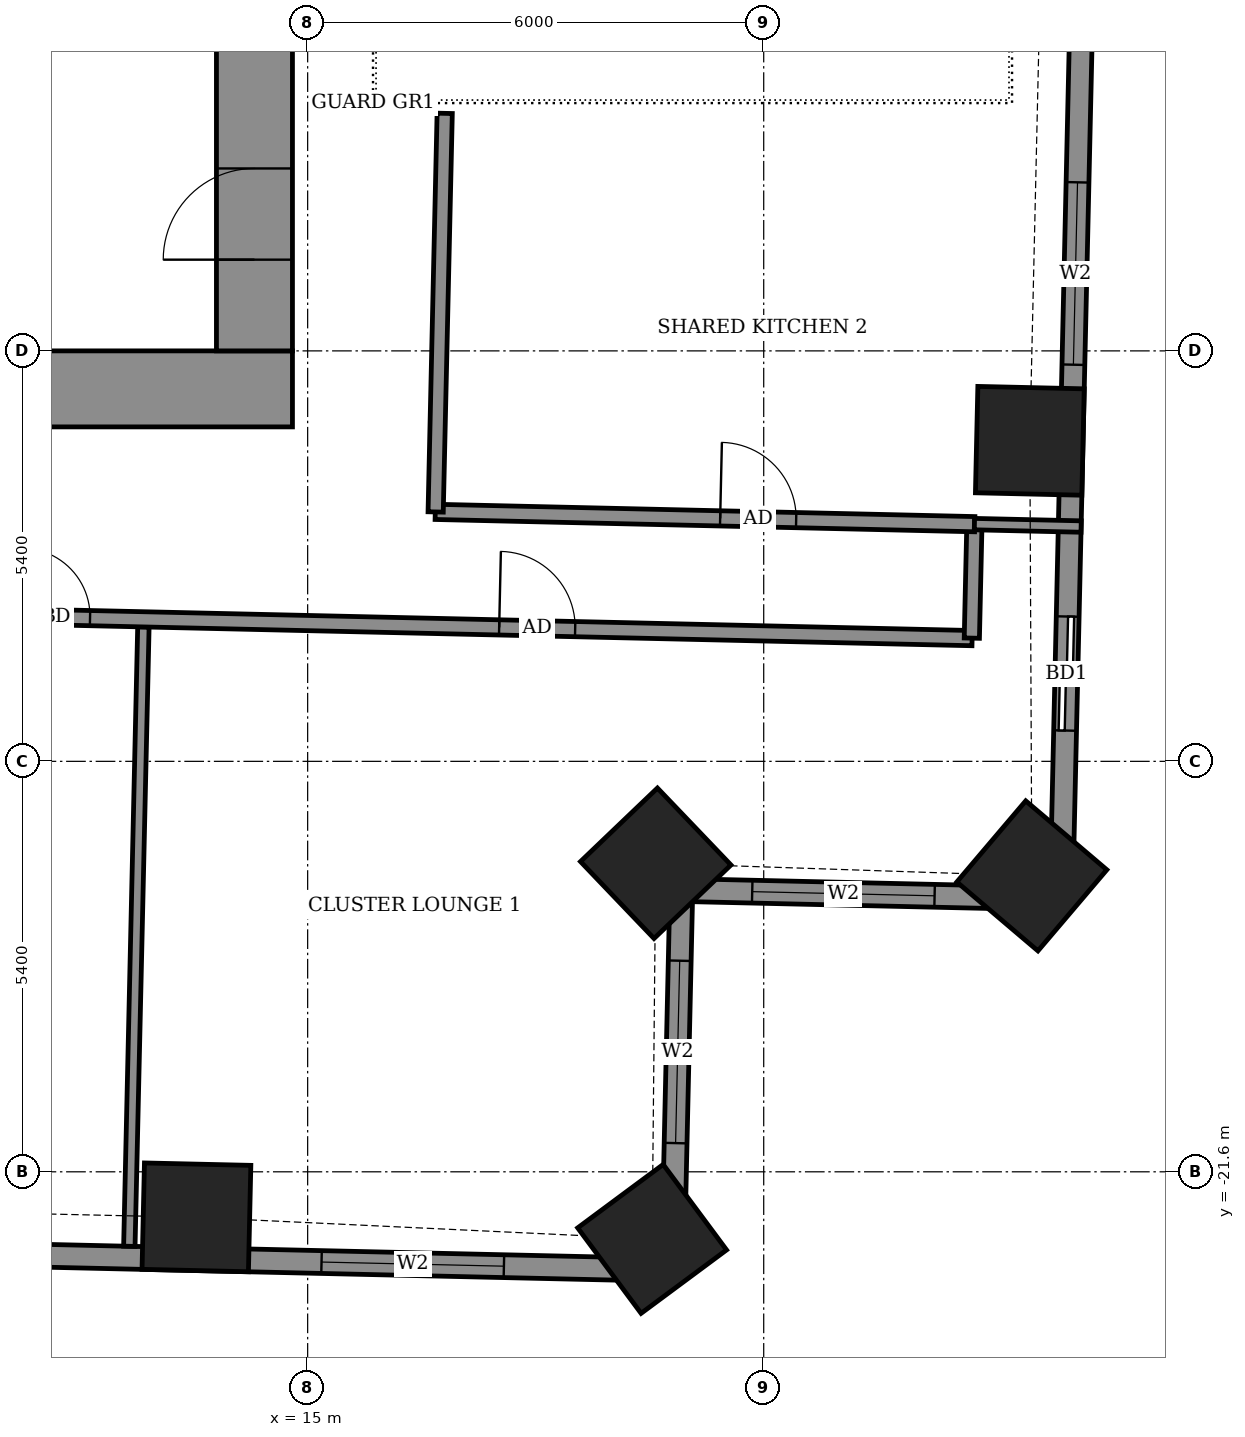
"""IFC4 building model, lengths in metres.
Left out: names, types, materials, properties, quantities, classifications, styles, units other than length and angle.
Written with IfcOpenShell. Run it as: python <this file> out.ifc"""

import sys

from ifc_helpers import new_model, si_unit, direction, frame, frame_2d, origin, origin_2d, place, context, subcontext, project, spatial, rectangle, extrude, element, fill, save


model = new_model("IFC4")
c1 = context("Model", 3, precision=1e-05, world=origin(), true_north=direction((0.0, 1.0)))
c2 = subcontext(c1, "Body", "Model", "MODEL_VIEW")
j1 = project(units=[si_unit("LENGTHUNIT", "METRE"), si_unit("PLANEANGLEUNIT", "RADIAN")], contexts=[c1])
p1 = place(None, origin())
s1 = spatial("IfcSite", under=j1, at=p1, CompositionType="ELEMENT")
p2 = place(p1, origin())
s2 = spatial("IfcBuilding", under=s1, at=p2, CompositionType="ELEMENT")
p3 = place(p2, frame((0.0, 0.0, 109.1)))
s3 = spatial("IfcBuildingStorey", under=s2, at=p3, CompositionType="ELEMENT", Elevation=109.1)
for number, where, z_axis, x_axis in (
    (1, (13.537, -22.199, -0.55), (0.0, 0.0, 1.0), (1.0, -0.023, 0.0)),
    (2, (19.532, -22.483, -0.55), (0.0, 0.0, 1.0), (0.803, 0.596, 0.0)),
    (3, (19.579, -17.541, -0.55), (0.0, 0.0, 1.0), (0.723, 0.691, 0.0)),
    (4, (24.528, -17.707, -0.55), (0.0, 0.0, 1.0), (0.647, 0.762, 0.0)),
    (5, (24.501, -11.983, -0.55), (0.0, 0.0, 1.0), (0.023, 1.0, 0.0)),
):
    element("IfcColumn", number, at=place(p3, frame(where, z_axis=z_axis, x_axis=x_axis)), inside=s3, PredefinedType="COLUMN", context=c2, shape_type="SweptSolid", body=[
        extrude(rectangle(XDim=1.4, YDim=1.4, at=origin_2d()), origin(), (0.0, 0.0, 1.0), 3.6),
    ])
p4 = place(p3, frame((24.915, -18.007, 0.0), z_axis=(0.0, 0.0, 1.0), x_axis=(0.02263706344, 0.999743748847, 0.0)))
e6 = element("IfcWall", 6, at=p4, inside=s3, PredefinedType="SOLIDWALL", context=c2, shape_type="SweptSolid", body=[
    extrude(rectangle(XDim=12.23, YDim=0.3, at=frame_2d((6.115, 0.0))), origin(), (0.0, 0.0, 1.0), 3.05),
])
p5 = place(p4, frame((2.213, 0.0, 0.0)))
e7 = element("IfcOpeningElement", 7, at=p5, cuts=e6, PredefinedType="OPENING", context=c2, shape_type="SweptSolid", body=[
    extrude(rectangle(XDim=1.5, YDim=2.4, at=frame_2d((0.75, 1.2))), frame((0.0, 0.16, 0.0), z_axis=(0.0, -1.0, 0.0), x_axis=(1.0, 0.0, 0.0)), (0.0, 0.0, 1.0), 0.32),
])
p6 = place(p4, frame((7.027, 0.0, 0.9)))
e8 = element("IfcOpeningElement", 8, at=p6, cuts=e6, PredefinedType="OPENING", context=c2, shape_type="SweptSolid", body=[
    extrude(rectangle(XDim=2.4, YDim=1.5, at=frame_2d((1.2, 0.75))), frame((0.0, 0.16, 0.0), z_axis=(0.0, -1.0, 0.0), x_axis=(1.0, 0.0, 0.0)), (0.0, 0.0, 1.0), 0.32),
])
p7 = place(p3, frame((-24.894, -21.878, 0.0), z_axis=(0.0, 0.0, 1.0), x_axis=(0.999742689045, -0.022683820265, 0.0)))
e9 = element("IfcWall", 9, at=p7, inside=s3, PredefinedType="SOLIDWALL", context=c2, shape_type="SweptSolid", body=[
    extrude(rectangle(XDim=44.708, YDim=0.3, at=frame_2d((22.354, 0.0))), origin(), (0.0, 0.0, 1.0), 3.05),
])
p8 = place(p7, frame((2.051, 0.0, 0.0)))
e10 = element("IfcOpeningElement", 10, at=p8, cuts=e9, PredefinedType="OPENING", context=c2, shape_type="SweptSolid", body=[
    extrude(rectangle(XDim=1.5, YDim=2.4, at=frame_2d((0.75, 1.2))), frame((0.0, 0.16, 0.0), z_axis=(0.0, -1.0, 0.0), x_axis=(1.0, 0.0, 0.0)), (0.0, 0.0, 1.0), 0.32),
])
p9 = place(p7, frame((7.265, 0.0, 0.0)))
e11 = element("IfcOpeningElement", 11, at=p9, cuts=e9, PredefinedType="OPENING", context=c2, shape_type="SweptSolid", body=[
    extrude(rectangle(XDim=1.5, YDim=2.4, at=frame_2d((0.75, 1.2))), frame((0.0, 0.16, 0.0), z_axis=(0.0, -1.0, 0.0), x_axis=(1.0, 0.0, 0.0)), (0.0, 0.0, 1.0), 0.32),
])
p10 = place(p7, frame((10.03, 0.0, 0.0)))
e12 = element("IfcOpeningElement", 12, at=p10, cuts=e9, PredefinedType="OPENING", context=c2, shape_type="SweptSolid", body=[
    extrude(rectangle(XDim=1.5, YDim=2.4, at=frame_2d((0.75, 1.2))), frame((0.0, 0.16, 0.0), z_axis=(0.0, -1.0, 0.0), x_axis=(1.0, 0.0, 0.0)), (0.0, 0.0, 1.0), 0.32),
])
p11 = place(p7, frame((15.5, 0.0, 0.0)))
e13 = element("IfcOpeningElement", 13, at=p11, cuts=e9, PredefinedType="OPENING", context=c2, shape_type="SweptSolid", body=[
    extrude(rectangle(XDim=1.5, YDim=2.4, at=frame_2d((0.75, 1.2))), frame((0.0, 0.16, 0.0), z_axis=(0.0, -1.0, 0.0), x_axis=(1.0, 0.0, 0.0)), (0.0, 0.0, 1.0), 0.32),
])
p12 = place(p7, frame((20.745, 0.0, 0.0)))
e14 = element("IfcOpeningElement", 14, at=p12, cuts=e9, PredefinedType="OPENING", context=c2, shape_type="SweptSolid", body=[
    extrude(rectangle(XDim=1.5, YDim=2.4, at=frame_2d((0.75, 1.2))), frame((0.0, 0.16, 0.0), z_axis=(0.0, -1.0, 0.0), x_axis=(1.0, 0.0, 0.0)), (0.0, 0.0, 1.0), 0.32),
])
p13 = place(p7, frame((26.41, 0.0, 0.0)))
e15 = element("IfcOpeningElement", 15, at=p13, cuts=e9, PredefinedType="OPENING", context=c2, shape_type="SweptSolid", body=[
    extrude(rectangle(XDim=1.2, YDim=2.4, at=frame_2d((0.6, 1.2))), frame((0.0, 0.16, 0.0), z_axis=(0.0, -1.0, 0.0), x_axis=(1.0, 0.0, 0.0)), (0.0, 0.0, 1.0), 0.32),
])
p14 = place(p7, frame((29.024, 0.0, 0.0)))
e16 = element("IfcOpeningElement", 16, at=p14, cuts=e9, PredefinedType="OPENING", context=c2, shape_type="SweptSolid", body=[
    extrude(rectangle(XDim=1.5, YDim=2.4, at=frame_2d((0.75, 1.2))), frame((0.0, 0.16, 0.0), z_axis=(0.0, -1.0, 0.0), x_axis=(1.0, 0.0, 0.0)), (0.0, 0.0, 1.0), 0.32),
])
p15 = place(p7, frame((34.45, 0.0, 0.0)))
e17 = element("IfcOpeningElement", 17, at=p15, cuts=e9, PredefinedType="OPENING", context=c2, shape_type="SweptSolid", body=[
    extrude(rectangle(XDim=1.5, YDim=2.4, at=frame_2d((0.75, 1.2))), frame((0.0, 0.16, 0.0), z_axis=(0.0, -1.0, 0.0), x_axis=(1.0, 0.0, 0.0)), (0.0, 0.0, 1.0), 0.32),
])
p16 = place(p7, frame((40.087, 0.0, 0.9)))
e18 = element("IfcOpeningElement", 18, at=p16, cuts=e9, PredefinedType="OPENING", context=c2, shape_type="SweptSolid", body=[
    extrude(rectangle(XDim=2.4, YDim=1.5, at=frame_2d((1.2, 0.75))), frame((0.0, 0.16, 0.0), z_axis=(0.0, -1.0, 0.0), x_axis=(1.0, 0.0, 0.0)), (0.0, 0.0, 1.0), 0.32),
])
p17 = place(p3, frame((19.803, -22.892, 0.0), z_axis=(0.0, 0.0, 1.0), x_axis=(0.022606059803, 0.999744450377, 0.0)))
e19 = element("IfcWall", 19, at=p17, inside=s3, PredefinedType="SOLIDWALL", context=c2, shape_type="SweptSolid", body=[
    extrude(rectangle(XDim=5.0, YDim=0.3, at=frame_2d((2.5, 0.0))), origin(), (0.0, 0.0, 1.0), 2.55),
])
p18 = place(p17, frame((1.67, 0.0, 0.9)))
e20 = element("IfcOpeningElement", 20, at=p18, cuts=e19, PredefinedType="OPENING", context=c2, shape_type="SweptSolid", body=[
    extrude(rectangle(XDim=2.4, YDim=1.5, at=frame_2d((1.2, 0.75))), frame((0.0, 0.16, 0.0), z_axis=(0.0, -1.0, 0.0), x_axis=(1.0, 0.0, 0.0)), (0.0, 0.0, 1.0), 0.32),
])
p19 = place(p3, frame((19.916, -17.893, 0.0), z_axis=(0.0, 0.0, 1.0), x_axis=(0.999740017489, -0.022801259434, 0.0)))
e21 = element("IfcWall", 21, at=p19, inside=s3, PredefinedType="SOLIDWALL", context=c2, shape_type="SweptSolid", body=[
    extrude(rectangle(XDim=5.0, YDim=0.3, at=frame_2d((2.5, 0.0))), origin(), (0.0, 0.0, 1.0), 2.55),
])
p20 = place(p19, frame((0.933, 0.0, 0.9)))
e22 = element("IfcOpeningElement", 22, at=p20, cuts=e21, PredefinedType="OPENING", context=c2, shape_type="SweptSolid", body=[
    extrude(rectangle(XDim=2.4, YDim=1.5, at=frame_2d((1.2, 0.75))), frame((0.0, 0.16, 0.0), z_axis=(0.0, -1.0, 0.0), x_axis=(1.0, 0.0, 0.0)), (0.0, 0.0, 1.0), 0.32),
])
p21 = place(p3, frame((12.654, -22.58, 0.0), z_axis=(0.0, 0.0, 1.0), x_axis=(0.022705755232, 0.999742191107, 0.0)))
e23 = element("IfcWall", 23, at=p21, inside=s3, PredefinedType="PARTITIONING", context=c2, shape_type="SweptSolid", body=[
    extrude(rectangle(XDim=8.15, YDim=0.15, at=frame_2d((4.075, 0.0))), origin(), (0.0, 0.0, 1.0), 2.55),
])
p22 = place(p3, frame((-26.953, -13.429, 0.0), z_axis=(0.0, 0.0, 1.0), x_axis=(0.999742734556, -0.02268181435, 0.0)))
e24 = element("IfcWall", 24, at=p22, inside=s3, PredefinedType="PARTITIONING", context=c2, shape_type="SweptSolid", body=[
    extrude(rectangle(XDim=50.708, YDim=0.2, at=frame_2d((25.354, 0.0))), origin(), (0.0, 0.0, 1.0), 3.05),
])
p23 = place(p22, frame((0.5, 0.0, 0.0)))
e25 = element("IfcOpeningElement", 25, at=p23, cuts=e24, PredefinedType="OPENING", context=c2, shape_type="SweptSolid", body=[
    extrude(rectangle(XDim=1.0, YDim=2.1, at=frame_2d((0.5, 1.05))), frame((0.0, 0.11, 0.0), z_axis=(0.0, -1.0, 0.0), x_axis=(1.0, 0.0, 0.0)), (0.0, 0.0, 1.0), 0.22),
])
p24 = place(p22, frame((5.05, 0.0, 0.0)))
e26 = element("IfcOpeningElement", 26, at=p24, cuts=e24, PredefinedType="OPENING", context=c2, shape_type="SweptSolid", body=[
    extrude(rectangle(XDim=0.9, YDim=2.1, at=frame_2d((0.45, 1.05))), frame((0.0, 0.11, 0.0), z_axis=(0.0, -1.0, 0.0), x_axis=(1.0, 0.0, 0.0)), (0.0, 0.0, 1.0), 0.22),
])
p25 = place(p22, frame((9.975, 0.0, 0.0)))
e27 = element("IfcOpeningElement", 27, at=p25, cuts=e24, PredefinedType="OPENING", context=c2, shape_type="SweptSolid", body=[
    extrude(rectangle(XDim=0.9, YDim=2.1, at=frame_2d((0.45, 1.05))), frame((0.0, 0.11, 0.0), z_axis=(0.0, -1.0, 0.0), x_axis=(1.0, 0.0, 0.0)), (0.0, 0.0, 1.0), 0.22),
])
p26 = place(p22, frame((12.175, 0.0, 0.0)))
e28 = element("IfcOpeningElement", 28, at=p26, cuts=e24, PredefinedType="OPENING", context=c2, shape_type="SweptSolid", body=[
    extrude(rectangle(XDim=0.9, YDim=2.1, at=frame_2d((0.45, 1.05))), frame((0.0, 0.11, 0.0), z_axis=(0.0, -1.0, 0.0), x_axis=(1.0, 0.0, 0.0)), (0.0, 0.0, 1.0), 0.22),
])
p27 = place(p22, frame((19.25, 0.0, 0.0)))
e29 = element("IfcOpeningElement", 29, at=p27, cuts=e24, PredefinedType="OPENING", context=c2, shape_type="SweptSolid", body=[
    extrude(rectangle(XDim=0.9, YDim=2.1, at=frame_2d((0.45, 1.05))), frame((0.0, 0.11, 0.0), z_axis=(0.0, -1.0, 0.0), x_axis=(1.0, 0.0, 0.0)), (0.0, 0.0, 1.0), 0.22),
])
p28 = place(p22, frame((21.625, 0.0, 0.0)))
e30 = element("IfcOpeningElement", 30, at=p28, cuts=e24, PredefinedType="OPENING", context=c2, shape_type="SweptSolid", body=[
    extrude(rectangle(XDim=0.9, YDim=2.1, at=frame_2d((0.45, 1.05))), frame((0.0, 0.11, 0.0), z_axis=(0.0, -1.0, 0.0), x_axis=(1.0, 0.0, 0.0)), (0.0, 0.0, 1.0), 0.22),
])
p29 = place(p22, frame((28.7, 0.0, 0.0)))
e31 = element("IfcOpeningElement", 31, at=p29, cuts=e24, PredefinedType="OPENING", context=c2, shape_type="SweptSolid", body=[
    extrude(rectangle(XDim=0.9, YDim=2.1, at=frame_2d((0.45, 1.05))), frame((0.0, 0.11, 0.0), z_axis=(0.0, -1.0, 0.0), x_axis=(1.0, 0.0, 0.0)), (0.0, 0.0, 1.0), 0.22),
])
p30 = place(p22, frame((31.025, 0.0, 0.0)))
e32 = element("IfcOpeningElement", 32, at=p30, cuts=e24, PredefinedType="OPENING", context=c2, shape_type="SweptSolid", body=[
    extrude(rectangle(XDim=0.9, YDim=2.1, at=frame_2d((0.45, 1.05))), frame((0.0, 0.11, 0.0), z_axis=(0.0, -1.0, 0.0), x_axis=(1.0, 0.0, 0.0)), (0.0, 0.0, 1.0), 0.22),
])
p31 = place(p22, frame((38.2, 0.0, 0.0)))
e33 = element("IfcOpeningElement", 33, at=p31, cuts=e24, PredefinedType="OPENING", context=c2, shape_type="SweptSolid", body=[
    extrude(rectangle(XDim=0.9, YDim=2.1, at=frame_2d((0.45, 1.05))), frame((0.0, 0.11, 0.0), z_axis=(0.0, -1.0, 0.0), x_axis=(1.0, 0.0, 0.0)), (0.0, 0.0, 1.0), 0.22),
])
p32 = place(p22, frame((44.484, 0.0, 0.0)))
e34 = element("IfcOpeningElement", 34, at=p32, cuts=e24, PredefinedType="OPENING", context=c2, shape_type="SweptSolid", body=[
    extrude(rectangle(XDim=1.0, YDim=2.1, at=frame_2d((0.5, 1.05))), frame((0.0, 0.11, 0.0), z_axis=(0.0, -1.0, 0.0), x_axis=(1.0, 0.0, 0.0)), (0.0, 0.0, 1.0), 0.22),
])
p33 = place(p3, frame((23.738, -14.579, 0.0), z_axis=(0.0, 0.0, 1.0), x_axis=(0.022617910375, 0.999744182344, 0.0)))
e35 = element("IfcWall", 35, at=p33, inside=s3, PredefinedType="PARTITIONING", context=c2, shape_type="SweptSolid", body=[
    extrude(rectangle(XDim=1.5, YDim=0.2, at=frame_2d((0.75, 0.0))), origin(), (0.0, 0.0, 1.0), 3.05),
])
p34 = place(p3, frame((16.679, -12.918, 0.0), z_axis=(0.0, 0.0, 1.0), x_axis=(0.999739218926, -0.02283624622, 0.0)))
e36 = element("IfcWall", 36, at=p34, inside=s3, PredefinedType="PARTITIONING", context=c2, shape_type="SweptSolid", body=[
    extrude(rectangle(XDim=7.099, YDim=0.2, at=frame_2d((3.549, 0.0))), origin(), (0.0, 0.0, 1.0), 3.05),
])
p35 = place(p34, frame((3.749, 0.0, 0.0)))
e37 = element("IfcOpeningElement", 37, at=p35, cuts=e36, PredefinedType="OPENING", context=c2, shape_type="SweptSolid", body=[
    extrude(rectangle(XDim=1.0, YDim=2.1, at=frame_2d((0.5, 1.05))), frame((0.0, 0.11, 0.0), z_axis=(0.0, -1.0, 0.0), x_axis=(1.0, 0.0, 0.0)), (0.0, 0.0, 1.0), 0.22),
])
p36 = place(p3, frame((16.684, -12.919, 0.0), z_axis=(0.0, 0.0, 1.0), x_axis=(0.022667483124, 0.999743059595, 0.0)))
e38 = element("IfcWall", 38, at=p36, inside=s3, PredefinedType="PARTITIONING", context=c2, shape_type="SweptSolid", body=[
    extrude(rectangle(XDim=5.245, YDim=0.2, at=frame_2d((2.623, 0.0))), origin(), (0.0, 0.0, 1.0), 3.05),
])
p37 = place(p3, frame((23.772, -13.079, 0.0), z_axis=(0.0, 0.0, 1.0), x_axis=(0.999740667531, -0.022772739949, 0.0)))
e39 = element("IfcWall", 39, at=p37, inside=s3, PredefinedType="PARTITIONING", context=c2, shape_type="SweptSolid", body=[
    extrude(rectangle(XDim=1.404, YDim=0.15, at=frame_2d((0.702, 0.0))), origin(), (0.0, 0.0, 1.0), 2.55),
])
p38 = place(p3, frame((-14.8, -11.3, 0.0), z_axis=(0.0, 0.0, 1.0), x_axis=(1.0, 0.0, 0.0)))
e40 = element("IfcWall", 40, at=p38, inside=s3, PredefinedType="SHEAR", context=c2, shape_type="SweptSolid", body=[
    extrude(rectangle(XDim=29.6, YDim=1.0, at=frame_2d((14.8, 0.0))), origin(), (0.0, 0.0, 1.0), 3.6),
])
p39 = place(p3, frame((14.3, -10.8, 0.0), z_axis=(0.0, 0.0, 1.0), x_axis=(0.0, 1.0, 0.0)))
e41 = element("IfcWall", 41, at=p39, inside=s3, PredefinedType="SHEAR", context=c2, shape_type="SweptSolid", body=[
    extrude(rectangle(XDim=21.6, YDim=1.0, at=frame_2d((10.8, 0.0))), origin(), (0.0, 0.0, 1.0), 3.6),
])
p40 = place(p39, frame((1.2, 0.0, 0.0)))
e42 = element("IfcOpeningElement", 42, at=p40, cuts=e41, PredefinedType="OPENING", context=c2, shape_type="SweptSolid", body=[
    extrude(rectangle(XDim=1.2, YDim=2.1, at=frame_2d((0.6, 1.05))), frame((0.0, 0.51, 0.0), z_axis=(0.0, -1.0, 0.0), x_axis=(1.0, 0.0, 0.0)), (0.0, 0.0, 1.0), 1.02),
])
p41 = place(p5, origin())
e43 = element("IfcDoor", 43, at=p41, inside=s3, OperationType="SLIDING_TO_LEFT", PredefinedType="DOOR", context=c2, shape_type="SweptSolid", body=[
    extrude(rectangle(XDim=1.5, YDim=2.4, at=frame_2d((0.75, 1.2))), frame((0.0, 0.025, 0.0), z_axis=(0.0, -1.0, 0.0), x_axis=(1.0, 0.0, 0.0)), (0.0, 0.0, 1.0), 0.05),
])
fill(e7, e43)
p42 = place(p6, origin())
e44 = element("IfcWindow", 44, at=p42, inside=s3, PartitioningType="DOUBLE_PANEL_VERTICAL", PredefinedType="WINDOW", context=c2, shape_type="SweptSolid", body=[
    extrude(rectangle(XDim=2.4, YDim=1.5, at=frame_2d((1.2, 0.75))), frame((0.0, 0.03, 0.0), z_axis=(0.0, -1.0, 0.0), x_axis=(1.0, 0.0, 0.0)), (0.0, 0.0, 1.0), 0.06),
])
fill(e8, e44)
p43 = place(p16, origin())
e45 = element("IfcWindow", 45, at=p43, inside=s3, PartitioningType="DOUBLE_PANEL_VERTICAL", PredefinedType="WINDOW", context=c2, shape_type="SweptSolid", body=[
    extrude(rectangle(XDim=2.4, YDim=1.5, at=frame_2d((1.2, 0.75))), frame((0.0, 0.03, 0.0), z_axis=(0.0, -1.0, 0.0), x_axis=(1.0, 0.0, 0.0)), (0.0, 0.0, 1.0), 0.06),
])
fill(e18, e45)
p44 = place(p18, origin())
e46 = element("IfcWindow", 46, at=p44, inside=s3, PartitioningType="DOUBLE_PANEL_VERTICAL", PredefinedType="WINDOW", context=c2, shape_type="SweptSolid", body=[
    extrude(rectangle(XDim=2.4, YDim=1.5, at=frame_2d((1.2, 0.75))), frame((0.0, 0.03, 0.0), z_axis=(0.0, -1.0, 0.0), x_axis=(1.0, 0.0, 0.0)), (0.0, 0.0, 1.0), 0.06),
])
fill(e20, e46)
p45 = place(p20, origin())
e47 = element("IfcWindow", 47, at=p45, inside=s3, PartitioningType="DOUBLE_PANEL_VERTICAL", PredefinedType="WINDOW", context=c2, shape_type="SweptSolid", body=[
    extrude(rectangle(XDim=2.4, YDim=1.5, at=frame_2d((1.2, 0.75))), frame((0.0, 0.03, 0.0), z_axis=(0.0, -1.0, 0.0), x_axis=(1.0, 0.0, 0.0)), (0.0, 0.0, 1.0), 0.06),
])
fill(e22, e47)
p46 = place(p31, origin())
e48 = element("IfcDoor", 48, at=p46, inside=s3, OperationType="SINGLE_SWING_LEFT", PredefinedType="DOOR", context=c2, shape_type="SweptSolid", body=[
    extrude(rectangle(XDim=0.9, YDim=2.1, at=frame_2d((0.45, 1.05))), frame((0.0, 0.025, 0.0), z_axis=(0.0, -1.0, 0.0), x_axis=(1.0, 0.0, 0.0)), (0.0, 0.0, 1.0), 0.05),
])
fill(e33, e48)
p47 = place(p32, origin())
e49 = element("IfcDoor", 49, at=p47, inside=s3, OperationType="SINGLE_SWING_RIGHT", PredefinedType="DOOR", context=c2, shape_type="SweptSolid", body=[
    extrude(rectangle(XDim=1.0, YDim=2.1, at=frame_2d((0.5, 1.05))), frame((0.0, 0.025, 0.0), z_axis=(0.0, -1.0, 0.0), x_axis=(1.0, 0.0, 0.0)), (0.0, 0.0, 1.0), 0.05),
])
fill(e34, e49)
p48 = place(p35, origin())
e50 = element("IfcDoor", 50, at=p48, inside=s3, OperationType="SINGLE_SWING_LEFT", PredefinedType="DOOR", context=c2, shape_type="SweptSolid", body=[
    extrude(rectangle(XDim=1.0, YDim=2.1, at=frame_2d((0.5, 1.05))), frame((0.0, 0.025, 0.0), z_axis=(0.0, -1.0, 0.0), x_axis=(1.0, 0.0, 0.0)), (0.0, 0.0, 1.0), 0.05),
])
fill(e37, e50)
p49 = place(p40, origin())
e51 = element("IfcDoor", 51, at=p49, inside=s3, OperationType="DOUBLE_DOOR_SINGLE_SWING", PredefinedType="DOOR", context=c2, shape_type="SweptSolid", body=[
    extrude(rectangle(XDim=1.2, YDim=2.1, at=frame_2d((0.6, 1.05))), frame((0.0, 0.025, 0.0), z_axis=(0.0, -1.0, 0.0), x_axis=(1.0, 0.0, 0.0)), (0.0, 0.0, 1.0), 0.05),
])
fill(e42, e51)
save(model, sys.argv[1])
